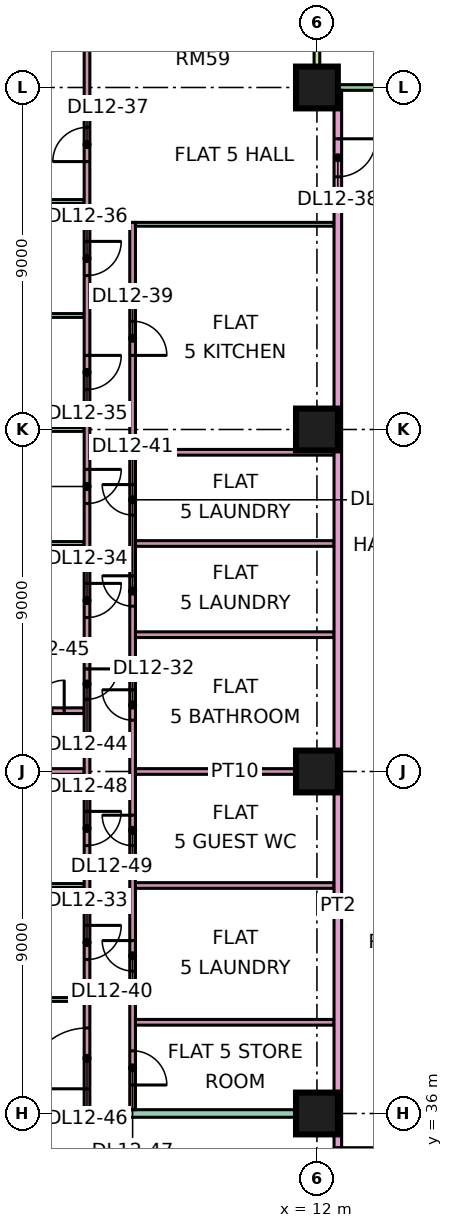
"""IFC4 building model, lengths in metres.
Left out: names, types, materials, properties, quantities, classifications, styles, units other than length and angle.
Written with IfcOpenShell. Run it as: python <this file> out.ifc"""

import sys

from ifc_helpers import new_model, si_unit, direction, frame, frame_2d, origin, origin_2d, place, context, subcontext, project, spatial, rectangle, extrude, element, fill, save


model = new_model("IFC4")
c1 = context("Model", 3, precision=1e-05, world=origin(), true_north=direction((0.0, 1.0)))
c2 = subcontext(c1, "Body", "Model", "MODEL_VIEW")
j1 = project(units=[si_unit("LENGTHUNIT", "METRE"), si_unit("PLANEANGLEUNIT", "RADIAN")], contexts=[c1])
p1 = place(None, origin())
s1 = spatial("IfcSite", under=j1, at=p1, CompositionType="ELEMENT")
p2 = place(p1, origin())
s2 = spatial("IfcBuilding", under=s1, at=p2, CompositionType="ELEMENT")
p3 = place(p2, frame((0.0, 0.0, 60.15)))
s3 = spatial("IfcBuildingStorey", under=s2, at=p3, CompositionType="ELEMENT", Elevation=60.15)
for number, where, z_axis, x_axis in (
    (1, (12.0, 36.0, 0.0), (0.0, 0.0, 1.0), (1.0, 0.0, 0.0)),
    (2, (12.0, 45.0, 0.0), (0.0, 0.0, 1.0), (1.0, 0.0, 0.0)),
    (3, (12.0, 54.0, 0.0), (0.0, 0.0, 1.0), (1.0, 0.0, 0.0)),
    (4, (12.0, 63.0, 0.0), (0.0, 0.0, 1.0), (1.0, 0.0, 0.0)),
):
    element("IfcColumn", number, at=place(p3, frame(where, z_axis=z_axis, x_axis=x_axis)), inside=s3, PredefinedType="COLUMN", context=c2, shape_type="SweptSolid", body=[
        extrude(rectangle(XDim=1.1, YDim=1.1, at=origin_2d()), origin(), (0.0, 0.0, 1.0), 3.75),
    ])
p4 = place(p3, frame((22.425, 63.0, 0.0), z_axis=(0.0, 0.0, 1.0), x_axis=(-1.0, 0.0, 0.0)))
e5 = element("IfcWall", 5, at=p4, inside=s3, PredefinedType="SOLIDWALL", context=c2, shape_type="SweptSolid", body=[
    extrude(rectangle(XDim=10.35, YDim=0.15, at=frame_2d((5.175, 0.0))), origin(), (0.0, 0.0, 1.0), 3.35),
])
p5 = place(p4, frame((2.512, 0.0, 0.0)))
e6 = element("IfcOpeningElement", 6, at=p5, cuts=e5, PredefinedType="OPENING", context=c2, shape_type="SweptSolid", body=[
    extrude(rectangle(XDim=1.8, YDim=2.4, at=frame_2d((0.9, 1.2))), frame((0.0, 0.085, 0.0), z_axis=(0.0, -1.0, 0.0), x_axis=(1.0, 0.0, 0.0)), (0.0, 0.0, 1.0), 0.17),
])
p6 = place(p3, frame((12.0, 64.5, 0.0), z_axis=(0.0, 0.0, 1.0), x_axis=(0.0, -1.0, 0.0)))
e7 = element("IfcWall", 7, at=p6, inside=s3, PredefinedType="SOLIDWALL", context=c2, shape_type="SweptSolid", body=[
    extrude(rectangle(XDim=1.5, YDim=0.15, at=frame_2d((0.75, 0.0))), origin(), (0.0, 0.0, 1.0), 3.35),
])
for number, where, z_axis, x_axis in (
    (8, (-1.351, 57.0, 0.0), (0.0, 0.0, 1.0), (1.0, 0.0, 0.0)),
    (9, (-1.351, 60.0, 0.0), (0.0, 0.0, 1.0), (1.0, 0.0, 0.0)),
):
    element("IfcWall", number, at=place(p3, frame(where, z_axis=z_axis, x_axis=x_axis)), inside=s3, PredefinedType="PARTITIONING", context=c2, shape_type="SweptSolid", body=[
        extrude(rectangle(XDim=7.226, YDim=0.1, at=frame_2d((3.613, 0.0))), origin(), (0.0, 0.0, 1.0), 3.35),
    ])
p7 = place(p3, frame((0.0, 36.0, 0.0), z_axis=(0.0, 0.0, 1.0), x_axis=(1.0, 0.0, 0.0)))
e10 = element("IfcWall", 10, at=p7, inside=s3, PredefinedType="PARTITIONING", context=c2, shape_type="SweptSolid", body=[
    extrude(rectangle(XDim=12.45, YDim=0.2, at=frame_2d((6.225, 0.0))), origin(), (0.0, 0.0, 1.0), 3.35),
])
p8 = place(p3, frame((0.0, 48.0, 0.0), z_axis=(0.0, 0.0, 1.0), x_axis=(1.0, 0.0, 0.0)))
e11 = element("IfcWall", 11, at=p8, inside=s3, PredefinedType="PARTITIONING", context=c2, shape_type="SweptSolid", body=[
    extrude(rectangle(XDim=5.875, YDim=0.1, at=frame_2d((2.938, 0.0))), origin(), (0.0, 0.0, 1.0), 3.35),
])
p9 = place(p3, frame((-1.35, 51.0, 0.0), z_axis=(0.0, 0.0, 1.0), x_axis=(1.0, 0.0, 0.0)))
e12 = element("IfcWall", 12, at=p9, inside=s3, PredefinedType="PARTITIONING", context=c2, shape_type="SweptSolid", body=[
    extrude(rectangle(XDim=7.225, YDim=0.1, at=frame_2d((3.613, 0.0))), origin(), (0.0, 0.0, 1.0), 3.35),
])
p10 = place(p3, frame((0.0, 54.0, 0.0), z_axis=(0.0, 0.0, 1.0), x_axis=(1.0, 0.0, 0.0)))
e13 = element("IfcWall", 13, at=p10, inside=s3, PredefinedType="PARTITIONING", context=c2, shape_type="SweptSolid", body=[
    extrude(rectangle(XDim=5.875, YDim=0.1, at=frame_2d((2.938, 0.0))), origin(), (0.0, 0.0, 1.0), 3.35),
])
for number, where, z_axis, x_axis in (
    (14, (0.074, 39.0, 0.0), (0.0, 0.0, 1.0), (1.0, 0.0, 0.0)),
    (15, (0.074, 42.0, 0.0), (0.0, 0.0, 1.0), (1.0, 0.0, 0.0)),
):
    element("IfcWall", number, at=place(p3, frame(where, z_axis=z_axis, x_axis=x_axis)), inside=s3, PredefinedType="PARTITIONING", context=c2, shape_type="SweptSolid", body=[
        extrude(rectangle(XDim=5.801, YDim=0.1, at=frame_2d((2.9, 0.0))), origin(), (0.0, 0.0, 1.0), 3.35),
    ])
p11 = place(p3, frame((0.074, 45.0, 0.0), z_axis=(0.0, 0.0, 1.0), x_axis=(1.0, 0.0, 0.0)))
e16 = element("IfcWall", 16, at=p11, inside=s3, PredefinedType="PARTITIONING", context=c2, shape_type="SweptSolid", body=[
    extrude(rectangle(XDim=5.801, YDim=0.15, at=frame_2d((2.9, 0.0))), origin(), (0.0, 0.0, 1.0), 3.35),
])
p12 = place(p3, frame((3.875, 46.6, 0.0), z_axis=(0.0, 0.0, 1.0), x_axis=(1.0, 0.0, 0.0)))
e17 = element("IfcWall", 17, at=p12, inside=s3, PredefinedType="PARTITIONING", context=c2, shape_type="SweptSolid", body=[
    extrude(rectangle(XDim=2.0, YDim=0.15, at=frame_2d((1.0, 0.0))), origin(), (0.0, 0.0, 1.0), 3.35),
])
p13 = place(p12, frame((0.675, 0.0, 0.0)))
e18 = element("IfcOpeningElement", 18, at=p13, cuts=e17, PredefinedType="OPENING", context=c2, shape_type="SweptSolid", body=[
    extrude(rectangle(XDim=0.8, YDim=2.1, at=frame_2d((0.4, 1.05))), frame((0.0, 0.085, 0.0), z_axis=(0.0, -1.0, 0.0), x_axis=(1.0, 0.0, 0.0)), (0.0, 0.0, 1.0), 0.17),
])
p14 = place(p3, frame((5.95, 36.1, 0.0), z_axis=(0.0, 0.0, 1.0), x_axis=(0.0, 1.0, 0.0)))
e19 = element("IfcWall", 19, at=p14, inside=s3, PredefinedType="PARTITIONING", context=c2, shape_type="SweptSolid", body=[
    extrude(rectangle(XDim=28.25, YDim=0.15, at=frame_2d((14.125, 0.0))), origin(), (0.0, 0.0, 1.0), 3.35),
])
p15 = place(p14, frame((3.95, 0.0, 0.0)))
e20 = element("IfcOpeningElement", 20, at=p15, cuts=e19, PredefinedType="OPENING", context=c2, shape_type="SweptSolid", body=[
    extrude(rectangle(XDim=0.9, YDim=2.1, at=frame_2d((0.45, 1.05))), frame((0.0, 0.085, 0.0), z_axis=(0.0, -1.0, 0.0), x_axis=(1.0, 0.0, 0.0)), (0.0, 0.0, 1.0), 0.17),
])
p16 = place(p14, frame((12.95, 0.0, 0.0)))
e21 = element("IfcOpeningElement", 21, at=p16, cuts=e19, PredefinedType="OPENING", context=c2, shape_type="SweptSolid", body=[
    extrude(rectangle(XDim=0.9, YDim=2.1, at=frame_2d((0.45, 1.05))), frame((0.0, 0.085, 0.0), z_axis=(0.0, -1.0, 0.0), x_axis=(1.0, 0.0, 0.0)), (0.0, 0.0, 1.0), 0.17),
])
p17 = place(p14, frame((18.95, 0.0, 0.0)))
e22 = element("IfcOpeningElement", 22, at=p17, cuts=e19, PredefinedType="OPENING", context=c2, shape_type="SweptSolid", body=[
    extrude(rectangle(XDim=0.9, YDim=2.1, at=frame_2d((0.45, 1.05))), frame((0.0, 0.085, 0.0), z_axis=(0.0, -1.0, 0.0), x_axis=(1.0, 0.0, 0.0)), (0.0, 0.0, 1.0), 0.17),
])
p18 = place(p14, frame((21.95, 0.0, 0.0)))
e23 = element("IfcOpeningElement", 23, at=p18, cuts=e19, PredefinedType="OPENING", context=c2, shape_type="SweptSolid", body=[
    extrude(rectangle(XDim=0.9, YDim=2.1, at=frame_2d((0.45, 1.05))), frame((0.0, 0.085, 0.0), z_axis=(0.0, -1.0, 0.0), x_axis=(1.0, 0.0, 0.0)), (0.0, 0.0, 1.0), 0.17),
])
p19 = place(p14, frame((24.95, 0.0, 0.0)))
e24 = element("IfcOpeningElement", 24, at=p19, cuts=e19, PredefinedType="OPENING", context=c2, shape_type="SweptSolid", body=[
    extrude(rectangle(XDim=0.9, YDim=2.1, at=frame_2d((0.45, 1.05))), frame((0.0, 0.085, 0.0), z_axis=(0.0, -1.0, 0.0), x_axis=(1.0, 0.0, 0.0)), (0.0, 0.0, 1.0), 0.17),
])
p20 = place(p14, frame((15.95, 0.0, 0.0)))
e25 = element("IfcOpeningElement", 25, at=p20, cuts=e19, PredefinedType="OPENING", context=c2, shape_type="SweptSolid", body=[
    extrude(rectangle(XDim=0.9, YDim=2.1, at=frame_2d((0.45, 1.05))), frame((0.0, 0.085, 0.0), z_axis=(0.0, -1.0, 0.0), x_axis=(1.0, 0.0, 0.0)), (0.0, 0.0, 1.0), 0.17),
])
p21 = place(p14, frame((10.8, 0.0, 0.0)))
e26 = element("IfcOpeningElement", 26, at=p21, cuts=e19, PredefinedType="OPENING", context=c2, shape_type="SweptSolid", body=[
    extrude(rectangle(XDim=0.8, YDim=2.1, at=frame_2d((0.4, 1.05))), frame((0.0, 0.085, 0.0), z_axis=(0.0, -1.0, 0.0), x_axis=(1.0, 0.0, 0.0)), (0.0, 0.0, 1.0), 0.17),
])
p22 = place(p14, frame((0.55, 0.0, 0.0)))
e27 = element("IfcOpeningElement", 27, at=p22, cuts=e19, PredefinedType="OPENING", context=c2, shape_type="SweptSolid", body=[
    extrude(rectangle(XDim=1.6, YDim=2.1, at=frame_2d((0.8, 1.05))), frame((0.0, 0.085, 0.0), z_axis=(0.0, -1.0, 0.0), x_axis=(1.0, 0.0, 0.0)), (0.0, 0.0, 1.0), 0.17),
])
p23 = place(p14, frame((6.95, 0.0, 0.0)))
e28 = element("IfcOpeningElement", 28, at=p23, cuts=e19, PredefinedType="OPENING", context=c2, shape_type="SweptSolid", body=[
    extrude(rectangle(XDim=0.9, YDim=2.1, at=frame_2d((0.45, 1.05))), frame((0.0, 0.085, 0.0), z_axis=(0.0, -1.0, 0.0), x_axis=(1.0, 0.0, 0.0)), (0.0, 0.0, 1.0), 0.17),
])
p24 = place(p3, frame((7.15, 36.1, 0.0), z_axis=(0.0, 0.0, 1.0), x_axis=(0.0, 1.0, 0.0)))
e29 = element("IfcWall", 29, at=p24, inside=s3, PredefinedType="PARTITIONING", context=c2, shape_type="SweptSolid", body=[
    extrude(rectangle(XDim=23.35, YDim=0.15, at=frame_2d((11.675, 0.0))), origin(), (0.0, 0.0, 1.0), 3.35),
])
p25 = place(p24, frame((10.25, 0.0, 0.0)))
e30 = element("IfcOpeningElement", 30, at=p25, cuts=e29, PredefinedType="OPENING", context=c2, shape_type="SweptSolid", body=[
    extrude(rectangle(XDim=0.8, YDim=2.1, at=frame_2d((0.4, 1.05))), frame((0.0, 0.085, 0.0), z_axis=(0.0, -1.0, 0.0), x_axis=(1.0, 0.0, 0.0)), (0.0, 0.0, 1.0), 0.17),
])
p26 = place(p24, frame((19.85, 0.0, 0.0)))
e31 = element("IfcOpeningElement", 31, at=p26, cuts=e29, PredefinedType="OPENING", context=c2, shape_type="SweptSolid", body=[
    extrude(rectangle(XDim=0.9, YDim=2.1, at=frame_2d((0.45, 1.05))), frame((0.0, 0.085, 0.0), z_axis=(0.0, -1.0, 0.0), x_axis=(1.0, 0.0, 0.0)), (0.0, 0.0, 1.0), 0.17),
])
p27 = place(p24, frame((3.65, 0.0, 0.0)))
e32 = element("IfcOpeningElement", 32, at=p27, cuts=e29, PredefinedType="OPENING", context=c2, shape_type="SweptSolid", body=[
    extrude(rectangle(XDim=0.8, YDim=2.1, at=frame_2d((0.4, 1.05))), frame((0.0, 0.085, 0.0), z_axis=(0.0, -1.0, 0.0), x_axis=(1.0, 0.0, 0.0)), (0.0, 0.0, 1.0), 0.17),
])
p28 = place(p24, frame((13.25, 0.0, 0.0)))
e33 = element("IfcOpeningElement", 33, at=p28, cuts=e29, PredefinedType="OPENING", context=c2, shape_type="SweptSolid", body=[
    extrude(rectangle(XDim=0.8, YDim=2.1, at=frame_2d((0.4, 1.05))), frame((0.0, 0.085, 0.0), z_axis=(0.0, -1.0, 0.0), x_axis=(1.0, 0.0, 0.0)), (0.0, 0.0, 1.0), 0.17),
])
p29 = place(p24, frame((15.65, 0.0, 0.0)))
e34 = element("IfcOpeningElement", 34, at=p29, cuts=e29, PredefinedType="OPENING", context=c2, shape_type="SweptSolid", body=[
    extrude(rectangle(XDim=0.8, YDim=2.1, at=frame_2d((0.4, 1.05))), frame((0.0, 0.085, 0.0), z_axis=(0.0, -1.0, 0.0), x_axis=(1.0, 0.0, 0.0)), (0.0, 0.0, 1.0), 0.17),
])
p30 = place(p24, frame((0.65, 0.0, 0.0)))
e35 = element("IfcOpeningElement", 35, at=p30, cuts=e29, PredefinedType="OPENING", context=c2, shape_type="SweptSolid", body=[
    extrude(rectangle(XDim=0.9, YDim=2.1, at=frame_2d((0.45, 1.05))), frame((0.0, 0.085, 0.0), z_axis=(0.0, -1.0, 0.0), x_axis=(1.0, 0.0, 0.0)), (0.0, 0.0, 1.0), 0.17),
])
p31 = place(p24, frame((6.95, 0.0, 0.0)))
e36 = element("IfcOpeningElement", 36, at=p31, cuts=e29, PredefinedType="OPENING", context=c2, shape_type="SweptSolid", body=[
    extrude(rectangle(XDim=0.8, YDim=2.1, at=frame_2d((0.4, 1.05))), frame((0.0, 0.085, 0.0), z_axis=(0.0, -1.0, 0.0), x_axis=(1.0, 0.0, 0.0)), (0.0, 0.0, 1.0), 0.17),
])
for number, where, z_axis, x_axis in (
    (37, (7.225, 38.4, 0.0), (0.0, 0.0, 1.0), (1.0, 0.0, 0.0)),
    (38, (7.225, 42.0, 0.0), (0.0, 0.0, 1.0), (1.0, 0.0, 0.0)),
    (39, (7.225, 45.0, 0.0), (0.0, 0.0, 1.0), (1.0, 0.0, 0.0)),
    (40, (7.225, 48.6, 0.0), (0.0, 0.0, 1.0), (1.0, 0.0, 0.0)),
    (41, (7.225, 51.0, 0.0), (0.0, 0.0, 1.0), (1.0, 0.0, 0.0)),
    (42, (7.225, 53.4, 0.0), (0.0, 0.0, 1.0), (1.0, 0.0, 0.0)),
):
    element("IfcWall", number, at=place(p3, frame(where, z_axis=z_axis, x_axis=x_axis)), inside=s3, PredefinedType="PARTITIONING", context=c2, shape_type="SweptSolid", body=[
        extrude(rectangle(XDim=5.225, YDim=0.15, at=frame_2d((2.612, 0.0))), origin(), (0.0, 0.0, 1.0), 3.35),
    ])
p32 = place(p3, frame((7.225, 59.4, 0.0), z_axis=(0.0, 0.0, 1.0), x_axis=(1.0, 0.0, 0.0)))
e43 = element("IfcWall", 43, at=p32, inside=s3, PredefinedType="PARTITIONING", context=c2, shape_type="SweptSolid", body=[
    extrude(rectangle(XDim=5.225, YDim=0.1, at=frame_2d((2.612, 0.0))), origin(), (0.0, 0.0, 1.0), 3.35),
])
p33 = place(p3, frame((12.55, 20.0, 0.0), z_axis=(0.0, 0.0, 1.0), x_axis=(0.0, 1.0, 0.0)))
e44 = element("IfcWall", 44, at=p33, inside=s3, PredefinedType="PARTITIONING", context=c2, shape_type="SweptSolid", body=[
    extrude(rectangle(XDim=42.926, YDim=0.2, at=frame_2d((21.463, 0.0))), origin(), (0.0, 0.0, 1.0), 3.35),
])
p34 = place(p33, frame((40.65, 0.0, 0.0)))
e45 = element("IfcOpeningElement", 45, at=p34, cuts=e44, PredefinedType="OPENING", context=c2, shape_type="SweptSolid", body=[
    extrude(rectangle(XDim=1.0, YDim=2.1, at=frame_2d((0.5, 1.05))), frame((0.0, 0.11, 0.0), z_axis=(0.0, -1.0, 0.0), x_axis=(1.0, 0.0, 0.0)), (0.0, 0.0, 1.0), 0.22),
])
p35 = place(p33, frame((0.6, 0.0, 0.0)))
e46 = element("IfcOpeningElement", 46, at=p35, cuts=e44, PredefinedType="OPENING", context=c2, shape_type="SweptSolid", body=[
    extrude(rectangle(XDim=1.2, YDim=2.1, at=frame_2d((0.6, 1.05))), frame((0.0, 0.11, 0.0), z_axis=(0.0, -1.0, 0.0), x_axis=(1.0, 0.0, 0.0)), (0.0, 0.0, 1.0), 0.22),
])
p36 = place(p33, frame((14.1, 0.0, 0.0)))
e47 = element("IfcOpeningElement", 47, at=p36, cuts=e44, PredefinedType="OPENING", context=c2, shape_type="SweptSolid", body=[
    extrude(rectangle(XDim=1.0, YDim=2.1, at=frame_2d((0.5, 1.05))), frame((0.0, 0.11, 0.0), z_axis=(0.0, -1.0, 0.0), x_axis=(1.0, 0.0, 0.0)), (0.0, 0.0, 1.0), 0.22),
])
p37 = place(p25, frame((0.8, 0.0, 0.0), z_axis=(0.0, 0.0, 1.0), x_axis=(-1.0, 0.0, 0.0)))
e48 = element("IfcDoor", 48, at=p37, inside=s3, OperationType="SINGLE_SWING_RIGHT", PredefinedType="DOOR", context=c2, shape_type="SweptSolid", body=[
    extrude(rectangle(XDim=0.8, YDim=2.1, at=frame_2d((0.4, 1.05))), frame((0.0, 0.025, 0.0), z_axis=(0.0, -1.0, 0.0), x_axis=(1.0, 0.0, 0.0)), (0.0, 0.0, 1.0), 0.05),
])
fill(e30, e48)
p38 = place(p15, origin())
e49 = element("IfcDoor", 49, at=p38, inside=s3, OperationType="SINGLE_SWING_RIGHT", PredefinedType="DOOR", context=c2, shape_type="SweptSolid", body=[
    extrude(rectangle(XDim=0.9, YDim=2.1, at=frame_2d((0.45, 1.05))), frame((0.0, 0.025, 0.0), z_axis=(0.0, -1.0, 0.0), x_axis=(1.0, 0.0, 0.0)), (0.0, 0.0, 1.0), 0.05),
])
fill(e20, e49)
p39 = place(p16, origin())
e50 = element("IfcDoor", 50, at=p39, inside=s3, OperationType="SINGLE_SWING_RIGHT", PredefinedType="DOOR", context=c2, shape_type="SweptSolid", body=[
    extrude(rectangle(XDim=0.9, YDim=2.1, at=frame_2d((0.45, 1.05))), frame((0.0, 0.025, 0.0), z_axis=(0.0, -1.0, 0.0), x_axis=(1.0, 0.0, 0.0)), (0.0, 0.0, 1.0), 0.05),
])
fill(e21, e50)
p40 = place(p17, origin())
e51 = element("IfcDoor", 51, at=p40, inside=s3, OperationType="SINGLE_SWING_RIGHT", PredefinedType="DOOR", context=c2, shape_type="SweptSolid", body=[
    extrude(rectangle(XDim=0.9, YDim=2.1, at=frame_2d((0.45, 1.05))), frame((0.0, 0.025, 0.0), z_axis=(0.0, -1.0, 0.0), x_axis=(1.0, 0.0, 0.0)), (0.0, 0.0, 1.0), 0.05),
])
fill(e22, e51)
p41 = place(p18, origin())
e52 = element("IfcDoor", 52, at=p41, inside=s3, OperationType="SINGLE_SWING_RIGHT", PredefinedType="DOOR", context=c2, shape_type="SweptSolid", body=[
    extrude(rectangle(XDim=0.9, YDim=2.1, at=frame_2d((0.45, 1.05))), frame((0.0, 0.025, 0.0), z_axis=(0.0, -1.0, 0.0), x_axis=(1.0, 0.0, 0.0)), (0.0, 0.0, 1.0), 0.05),
])
fill(e23, e52)
p42 = place(p19, origin())
e53 = element("IfcDoor", 53, at=p42, inside=s3, OperationType="SINGLE_SWING_LEFT", PredefinedType="DOOR", context=c2, shape_type="SweptSolid", body=[
    extrude(rectangle(XDim=0.9, YDim=2.1, at=frame_2d((0.45, 1.05))), frame((0.0, 0.025, 0.0), z_axis=(0.0, -1.0, 0.0), x_axis=(1.0, 0.0, 0.0)), (0.0, 0.0, 1.0), 0.05),
])
fill(e24, e53)
p43 = place(p34, origin())
e54 = element("IfcDoor", 54, at=p43, inside=s3, OperationType="SINGLE_SWING_RIGHT", PredefinedType="DOOR", context=c2, shape_type="SweptSolid", body=[
    extrude(rectangle(XDim=1.0, YDim=2.1, at=frame_2d((0.5, 1.05))), frame((0.0, 0.025, 0.0), z_axis=(0.0, -1.0, 0.0), x_axis=(1.0, 0.0, 0.0)), (0.0, 0.0, 1.0), 0.05),
])
fill(e45, e54)
p44 = place(p26, frame((0.9, 0.0, 0.0), z_axis=(0.0, 0.0, 1.0), x_axis=(-1.0, 0.0, 0.0)))
e55 = element("IfcDoor", 55, at=p44, inside=s3, OperationType="SINGLE_SWING_LEFT", PredefinedType="DOOR", context=c2, shape_type="SweptSolid", body=[
    extrude(rectangle(XDim=0.9, YDim=2.1, at=frame_2d((0.45, 1.05))), frame((0.0, 0.025, 0.0), z_axis=(0.0, -1.0, 0.0), x_axis=(1.0, 0.0, 0.0)), (0.0, 0.0, 1.0), 0.05),
])
fill(e31, e55)
p45 = place(p27, frame((0.8, 0.0, 0.0), z_axis=(0.0, 0.0, 1.0), x_axis=(-1.0, 0.0, 0.0)))
e56 = element("IfcDoor", 56, at=p45, inside=s3, OperationType="SINGLE_SWING_RIGHT", PredefinedType="DOOR", context=c2, shape_type="SweptSolid", body=[
    extrude(rectangle(XDim=0.8, YDim=2.1, at=frame_2d((0.4, 1.05))), frame((0.0, 0.025, 0.0), z_axis=(0.0, -1.0, 0.0), x_axis=(1.0, 0.0, 0.0)), (0.0, 0.0, 1.0), 0.05),
])
fill(e32, e56)
p46 = place(p28, frame((0.8, 0.0, 0.0), z_axis=(0.0, 0.0, 1.0), x_axis=(-1.0, 0.0, 0.0)))
e57 = element("IfcDoor", 57, at=p46, inside=s3, OperationType="SINGLE_SWING_RIGHT", PredefinedType="DOOR", context=c2, shape_type="SweptSolid", body=[
    extrude(rectangle(XDim=0.8, YDim=2.1, at=frame_2d((0.4, 1.05))), frame((0.0, 0.025, 0.0), z_axis=(0.0, -1.0, 0.0), x_axis=(1.0, 0.0, 0.0)), (0.0, 0.0, 1.0), 0.05),
])
fill(e33, e57)
p47 = place(p29, frame((0.8, 0.0, 0.0), z_axis=(0.0, 0.0, 1.0), x_axis=(-1.0, 0.0, 0.0)))
e58 = element("IfcDoor", 58, at=p47, inside=s3, OperationType="SINGLE_SWING_RIGHT", PredefinedType="DOOR", context=c2, shape_type="SweptSolid", body=[
    extrude(rectangle(XDim=0.8, YDim=2.1, at=frame_2d((0.4, 1.05))), frame((0.0, 0.025, 0.0), z_axis=(0.0, -1.0, 0.0), x_axis=(1.0, 0.0, 0.0)), (0.0, 0.0, 1.0), 0.05),
])
fill(e34, e58)
p48 = place(p20, origin())
e59 = element("IfcDoor", 59, at=p48, inside=s3, OperationType="SINGLE_SWING_RIGHT", PredefinedType="DOOR", context=c2, shape_type="SweptSolid", body=[
    extrude(rectangle(XDim=0.9, YDim=2.1, at=frame_2d((0.45, 1.05))), frame((0.0, 0.025, 0.0), z_axis=(0.0, -1.0, 0.0), x_axis=(1.0, 0.0, 0.0)), (0.0, 0.0, 1.0), 0.05),
])
fill(e25, e59)
p49 = place(p21, origin())
e60 = element("IfcDoor", 60, at=p49, inside=s3, OperationType="SINGLE_SWING_RIGHT", PredefinedType="DOOR", context=c2, shape_type="SweptSolid", body=[
    extrude(rectangle(XDim=0.8, YDim=2.1, at=frame_2d((0.4, 1.05))), frame((0.0, 0.025, 0.0), z_axis=(0.0, -1.0, 0.0), x_axis=(1.0, 0.0, 0.0)), (0.0, 0.0, 1.0), 0.05),
])
fill(e26, e60)
p50 = place(p13, frame((0.8, 0.0, 0.0), z_axis=(0.0, 0.0, 1.0), x_axis=(-1.0, 0.0, 0.0)))
e61 = element("IfcDoor", 61, at=p50, inside=s3, OperationType="SINGLE_SWING_RIGHT", PredefinedType="DOOR", context=c2, shape_type="SweptSolid", body=[
    extrude(rectangle(XDim=0.8, YDim=2.1, at=frame_2d((0.4, 1.05))), frame((0.0, 0.025, 0.0), z_axis=(0.0, -1.0, 0.0), x_axis=(1.0, 0.0, 0.0)), (0.0, 0.0, 1.0), 0.05),
])
fill(e18, e61)
p51 = place(p22, origin())
e62 = element("IfcDoor", 62, at=p51, inside=s3, OperationType="DOUBLE_DOOR_SINGLE_SWING", PredefinedType="DOOR", context=c2, shape_type="SweptSolid", body=[
    extrude(rectangle(XDim=1.6, YDim=2.1, at=frame_2d((0.8, 1.05))), frame((0.0, 0.025, 0.0), z_axis=(0.0, -1.0, 0.0), x_axis=(1.0, 0.0, 0.0)), (0.0, 0.0, 1.0), 0.05),
])
fill(e27, e62)
p52 = place(p30, frame((0.9, 0.0, 0.0), z_axis=(0.0, 0.0, 1.0), x_axis=(-1.0, 0.0, 0.0)))
e63 = element("IfcDoor", 63, at=p52, inside=s3, OperationType="SINGLE_SWING_LEFT", PredefinedType="DOOR", context=c2, shape_type="SweptSolid", body=[
    extrude(rectangle(XDim=0.9, YDim=2.1, at=frame_2d((0.45, 1.05))), frame((0.0, 0.025, 0.0), z_axis=(0.0, -1.0, 0.0), x_axis=(1.0, 0.0, 0.0)), (0.0, 0.0, 1.0), 0.05),
])
fill(e35, e63)
p53 = place(p23, origin())
e64 = element("IfcDoor", 64, at=p53, inside=s3, OperationType="SINGLE_SWING_RIGHT", PredefinedType="DOOR", context=c2, shape_type="SweptSolid", body=[
    extrude(rectangle(XDim=0.9, YDim=2.1, at=frame_2d((0.45, 1.05))), frame((0.0, 0.025, 0.0), z_axis=(0.0, -1.0, 0.0), x_axis=(1.0, 0.0, 0.0)), (0.0, 0.0, 1.0), 0.05),
])
fill(e28, e64)
p54 = place(p31, frame((0.8, 0.0, 0.0), z_axis=(0.0, 0.0, 1.0), x_axis=(-1.0, 0.0, 0.0)))
e65 = element("IfcDoor", 65, at=p54, inside=s3, OperationType="SINGLE_SWING_RIGHT", PredefinedType="DOOR", context=c2, shape_type="SweptSolid", body=[
    extrude(rectangle(XDim=0.8, YDim=2.1, at=frame_2d((0.4, 1.05))), frame((0.0, 0.025, 0.0), z_axis=(0.0, -1.0, 0.0), x_axis=(1.0, 0.0, 0.0)), (0.0, 0.0, 1.0), 0.05),
])
fill(e36, e65)
p55 = place(p36, origin())
e66 = element("IfcDoor", 66, at=p55, inside=s3, OperationType="SINGLE_SWING_RIGHT", PredefinedType="DOOR", context=c2, shape_type="SweptSolid", body=[
    extrude(rectangle(XDim=1.0, YDim=2.1, at=frame_2d((0.5, 1.05))), frame((0.0, 0.025, 0.0), z_axis=(0.0, -1.0, 0.0), x_axis=(1.0, 0.0, 0.0)), (0.0, 0.0, 1.0), 0.05),
])
fill(e47, e66)
save(model, sys.argv[1])
